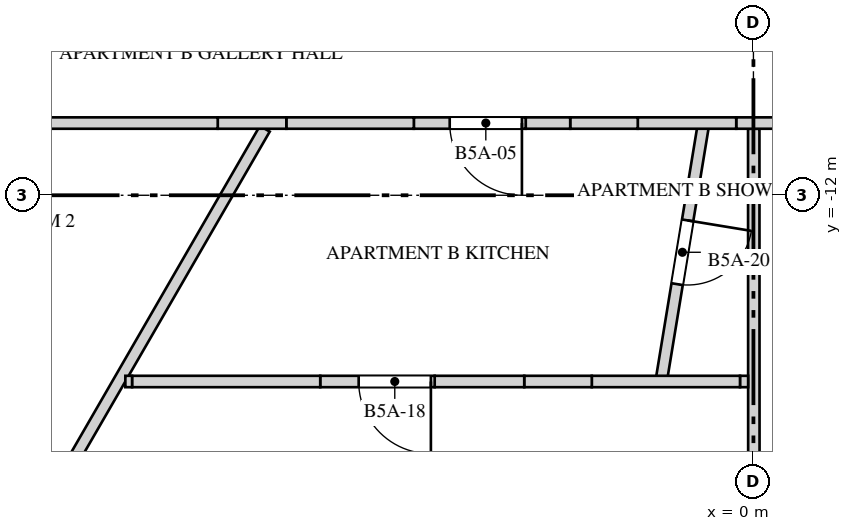
"""IFC4 building model, lengths in metres.
Left out: names, types, materials, properties, quantities, classifications, styles, units other than length and angle.
Written with IfcOpenShell. Run it as: python <this file> out.ifc"""

import sys

from ifc_helpers import new_model, si_unit, direction, frame, frame_2d, origin, place, context, subcontext, project, spatial, polyline, rectangle, outline, extrude, element, fill, save


model = new_model("IFC4")
c1 = context("Model", 3, precision=1e-05, world=origin(), true_north=direction((0.0, 1.0)))
c2 = subcontext(c1, "Body", "Model", "MODEL_VIEW")
j1 = project(units=[si_unit("LENGTHUNIT", "METRE"), si_unit("PLANEANGLEUNIT", "RADIAN")], contexts=[c1])
p1 = place(None, origin())
s1 = spatial("IfcSite", under=j1, at=p1, CompositionType="ELEMENT")
p2 = place(p1, origin())
s2 = spatial("IfcBuilding", under=s1, at=p2, CompositionType="ELEMENT")
p3 = place(p2, frame((0.0, 0.0, 200.0)))
s3 = spatial("IfcBuildingStorey", under=s2, at=p3, CompositionType="ELEMENT", Elevation=200.0)
p4 = place(p3, frame((-11.034, -19.095, 0.0), z_axis=(0.0, 0.0, 1.0), x_axis=(0.500337694151, 0.86583034817, 0.0)))
e1 = element("IfcWall", 1, at=p4, inside=s3, PredefinedType="PARTITIONING", context=c2, shape_type="SweptSolid", body=[
    extrude(rectangle(XDim=9.205, YDim=0.15, at=frame_2d((4.603, 0.0))), origin(), (0.0, 0.0, 1.0), 2.75),
])
p5 = place(p3, frame((-0.655, -11.052, 0.0), z_axis=(0.0, 0.0, 1.0), x_axis=(-0.162305002106, -0.986740637803, 0.0)))
e2 = element("IfcWall", 2, at=p5, inside=s3, PredefinedType="PARTITIONING", context=c2, shape_type="SweptSolid", body=[
    extrude(rectangle(XDim=3.442, YDim=0.15, at=frame_2d((1.721, 0.0))), origin(), (0.0, 0.0, 1.0), 3.65),
])
p6 = place(p5, frame((1.296, 0.0, 0.0)))
e3 = element("IfcOpeningElement", 3, at=p6, cuts=e2, PredefinedType="OPENING", context=c2, shape_type="SweptSolid", body=[
    extrude(rectangle(XDim=0.85, YDim=2.4, at=frame_2d((0.425, 1.2))), frame((0.0, 0.085, 0.0), z_axis=(0.0, -1.0, 0.0), x_axis=(1.0, 0.0, 0.0)), (0.0, 0.0, 1.0), 0.17),
])
p7 = place(p3, frame((0.004, -11.125, 0.0), z_axis=(0.0, 0.0, 1.0), x_axis=(0.00035743804, -0.999999936119, 0.0)))
e4 = element("IfcWall", 4, at=p7, inside=s3, PredefinedType="PARTITIONING", context=c2, shape_type="SweptSolid", body=[
    extrude(rectangle(XDim=10.928, YDim=0.15, at=frame_2d((5.464, 0.0))), origin(), (0.0, 0.0, 1.0), 2.75),
])
p8 = place(p3, frame((-0.07, -14.45, 0.0), z_axis=(0.0, 0.0, 1.0), x_axis=(-1.0, 0.0, 0.0)))
e5 = element("IfcWall", 5, at=p8, inside=s3, PredefinedType="PARTITIONING", context=c2, shape_type="SweptSolid", body=[
    extrude(rectangle(XDim=0.107, YDim=0.15, at=frame_2d((0.054, 0.0))), origin(), (0.0, 0.0, 1.0), 2.75),
])
p9 = place(p3, frame((-0.177, -14.45, 0.0), z_axis=(0.0, 0.0, 1.0), x_axis=(-1.0, 0.0, 0.0)))
e6 = element("IfcWall", 6, at=p9, inside=s3, PredefinedType="PARTITIONING", context=c2, shape_type="SweptSolid", body=[
    extrude(rectangle(XDim=1.95, YDim=0.15, at=frame_2d((0.975, 0.0))), origin(), (0.0, 0.0, 1.0), 3.65),
])
p10 = place(p3, frame((-2.127, -14.45, 0.0), z_axis=(0.0, 0.0, 1.0), x_axis=(-1.0, 0.0, 0.0)))
e7 = element("IfcWall", 7, at=p10, inside=s3, PredefinedType="PARTITIONING", context=c2, shape_type="SweptSolid", body=[
    extrude(rectangle(XDim=0.889, YDim=0.15, at=frame_2d((0.444, 0.0))), origin(), (0.0, 0.0, 1.0), 2.55),
])
p11 = place(p3, frame((-3.015, -14.45, 0.0), z_axis=(0.0, 0.0, 1.0), x_axis=(-1.0, 0.0, 0.0)))
e8 = element("IfcWall", 8, at=p11, inside=s3, PredefinedType="PARTITIONING", context=c2, shape_type="SweptSolid", body=[
    extrude(rectangle(XDim=1.178, YDim=0.15, at=frame_2d((0.589, 0.0))), origin(), (0.0, 0.0, 1.0), 3.65),
])
p12 = place(p3, frame((-4.193, -14.45, 0.0), z_axis=(0.0, 0.0, 1.0), x_axis=(-1.0, 0.0, 0.0)))
e9 = element("IfcWall", 9, at=p12, inside=s3, PredefinedType="PARTITIONING", context=c2, shape_type="SweptSolid", body=[
    extrude(outline(polyline([(0.0, 0.0), (1.506, 0.0), (1.506, 2.55), (0.575, 2.55), (0.575, 3.65), (0.0, 3.65), (0.0, 0.0)])), frame((0.0, 0.075, 0.0), z_axis=(0.0, -1.0, 0.0), x_axis=(1.0, 0.0, 0.0)), (0.0, 0.0, 1.0), 0.15),
])
p13 = place(p12, frame((0.05, 0.0, 0.0)))
e10 = element("IfcOpeningElement", 10, at=p13, cuts=e9, PredefinedType="OPENING", context=c2, shape_type="SweptSolid", body=[
    extrude(rectangle(XDim=0.95, YDim=2.4, at=frame_2d((0.475, 1.2))), frame((0.0, 0.085, 0.0), z_axis=(0.0, -1.0, 0.0), x_axis=(1.0, 0.0, 0.0)), (0.0, 0.0, 1.0), 0.17),
])
p14 = place(p3, frame((-5.699, -14.45, 0.0), z_axis=(0.0, 0.0, 1.0), x_axis=(-1.0, 0.0, 0.0)))
e11 = element("IfcWall", 11, at=p14, inside=s3, PredefinedType="PARTITIONING", context=c2, shape_type="SweptSolid", body=[
    extrude(rectangle(XDim=2.476, YDim=0.15, at=frame_2d((1.238, 0.0))), origin(), (0.0, 0.0, 1.0), 3.65),
])
p15 = place(p3, frame((-8.175, -14.45, 0.0), z_axis=(0.0, 0.0, 1.0), x_axis=(-1.0, 0.0, 0.0)))
e12 = element("IfcWall", 12, at=p15, inside=s3, PredefinedType="PARTITIONING", context=c2, shape_type="SweptSolid", body=[
    extrude(rectangle(XDim=0.088, YDim=0.15, at=frame_2d((0.044, 0.0))), origin(), (0.0, 0.0, 1.0), 2.75),
])
p16 = place(p3, frame((0.549, -11.05, 0.0), z_axis=(0.0, 0.0, 1.0), x_axis=(-1.0, 0.0, 0.0)))
e13 = element("IfcWall", 13, at=p16, inside=s3, PredefinedType="PARTITIONING", context=c2, shape_type="SweptSolid", body=[
    extrude(rectangle(XDim=0.775, YDim=0.15, at=frame_2d((0.388, 0.0))), origin(), (0.0, 0.0, 1.0), 2.75),
])
p17 = place(p3, frame((-0.226, -11.05, 0.0), z_axis=(0.0, 0.0, 1.0), x_axis=(-1.0, 0.0, 0.0)))
e14 = element("IfcWall", 14, at=p17, inside=s3, PredefinedType="PARTITIONING", context=c2, shape_type="SweptSolid", body=[
    extrude(rectangle(XDim=1.295, YDim=0.15, at=frame_2d((0.648, 0.0))), origin(), (0.0, 0.0, 1.0), 3.65),
])
p18 = place(p3, frame((-1.522, -11.05, 0.0), z_axis=(0.0, 0.0, 1.0), x_axis=(-1.0, 0.0, 0.0)))
e15 = element("IfcWall", 15, at=p18, inside=s3, PredefinedType="PARTITIONING", context=c2, shape_type="SweptSolid", body=[
    extrude(rectangle(XDim=0.889, YDim=0.15, at=frame_2d((0.444, 0.0))), origin(), (0.0, 0.0, 1.0), 2.55),
])
p19 = place(p3, frame((-2.41, -11.05, 0.0), z_axis=(0.0, 0.0, 1.0), x_axis=(-1.0, 0.0, 0.0)))
e16 = element("IfcWall", 16, at=p19, inside=s3, PredefinedType="PARTITIONING", context=c2, shape_type="SweptSolid", body=[
    extrude(rectangle(XDim=0.585, YDim=0.15, at=frame_2d((0.293, 0.0))), origin(), (0.0, 0.0, 1.0), 3.65),
])
p20 = place(p3, frame((-2.996, -11.05, 0.0), z_axis=(0.0, 0.0, 1.0), x_axis=(-1.0, 0.0, 0.0)))
e17 = element("IfcWall", 17, at=p20, inside=s3, PredefinedType="PARTITIONING", context=c2, shape_type="SweptSolid", body=[
    extrude(outline(polyline([(0.0, 0.0), (1.472, 0.0), (1.472, 2.55), (0.541, 2.55), (0.541, 3.65), (0.0, 3.65), (0.0, 0.0)])), frame((0.0, 0.075, 0.0), z_axis=(0.0, -1.0, 0.0), x_axis=(1.0, 0.0, 0.0)), (0.0, 0.0, 1.0), 0.15),
])
p21 = place(p20, frame((0.05, 0.0, 0.0)))
e18 = element("IfcOpeningElement", 18, at=p21, cuts=e17, PredefinedType="OPENING", context=c2, shape_type="SweptSolid", body=[
    extrude(rectangle(XDim=0.95, YDim=2.4, at=frame_2d((0.475, 1.2))), frame((0.0, 0.085, 0.0), z_axis=(0.0, -1.0, 0.0), x_axis=(1.0, 0.0, 0.0)), (0.0, 0.0, 1.0), 0.17),
])
p22 = place(p3, frame((-4.468, -11.05, 0.0), z_axis=(0.0, 0.0, 1.0), x_axis=(-1.0, 0.0, 0.0)))
e19 = element("IfcWall", 19, at=p22, inside=s3, PredefinedType="PARTITIONING", context=c2, shape_type="SweptSolid", body=[
    extrude(rectangle(XDim=1.677, YDim=0.15, at=frame_2d((0.839, 0.0))), origin(), (0.0, 0.0, 1.0), 3.65),
])
p23 = place(p3, frame((-6.145, -11.05, 0.0), z_axis=(0.0, 0.0, 1.0), x_axis=(-1.0, 0.0, 0.0)))
e20 = element("IfcWall", 20, at=p23, inside=s3, PredefinedType="PARTITIONING", context=c2, shape_type="SweptSolid", body=[
    extrude(rectangle(XDim=0.903, YDim=0.15, at=frame_2d((0.451, 0.0))), origin(), (0.0, 0.0, 1.0), 2.75),
])
p24 = place(p3, frame((-7.048, -11.05, 0.0), z_axis=(0.0, 0.0, 1.0), x_axis=(-1.0, 0.0, 0.0)))
e21 = element("IfcWall", 21, at=p24, inside=s3, PredefinedType="PARTITIONING", context=c2, shape_type="SweptSolid", body=[
    extrude(rectangle(XDim=4.239, YDim=0.15, at=frame_2d((2.12, 0.0))), origin(), (0.0, 0.0, 1.0), 3.65),
])
p25 = place(p21, origin())
e22 = element("IfcDoor", 22, at=p25, inside=s3, OperationType="SINGLE_SWING_LEFT", PredefinedType="DOOR", context=c2, shape_type="SweptSolid", body=[
    extrude(rectangle(XDim=0.95, YDim=2.4, at=frame_2d((0.475, 1.2))), frame((0.0, 0.025, 0.0), z_axis=(0.0, -1.0, 0.0), x_axis=(1.0, 0.0, 0.0)), (0.0, 0.0, 1.0), 0.05),
])
fill(e18, e22)
p26 = place(p13, origin())
e23 = element("IfcDoor", 23, at=p26, inside=s3, OperationType="SINGLE_SWING_RIGHT", PredefinedType="DOOR", context=c2, shape_type="SweptSolid", body=[
    extrude(rectangle(XDim=0.95, YDim=2.4, at=frame_2d((0.475, 1.2))), frame((0.0, 0.025, 0.0), z_axis=(0.0, -1.0, 0.0), x_axis=(1.0, 0.0, 0.0)), (0.0, 0.0, 1.0), 0.05),
])
fill(e10, e23)
p27 = place(p6, origin())
e24 = element("IfcDoor", 24, at=p27, inside=s3, OperationType="SINGLE_SWING_RIGHT", PredefinedType="DOOR", context=c2, shape_type="SweptSolid", body=[
    extrude(rectangle(XDim=0.85, YDim=2.4, at=frame_2d((0.425, 1.2))), frame((0.0, 0.025, 0.0), z_axis=(0.0, -1.0, 0.0), x_axis=(1.0, 0.0, 0.0)), (0.0, 0.0, 1.0), 0.05),
])
fill(e3, e24)
save(model, sys.argv[1])
